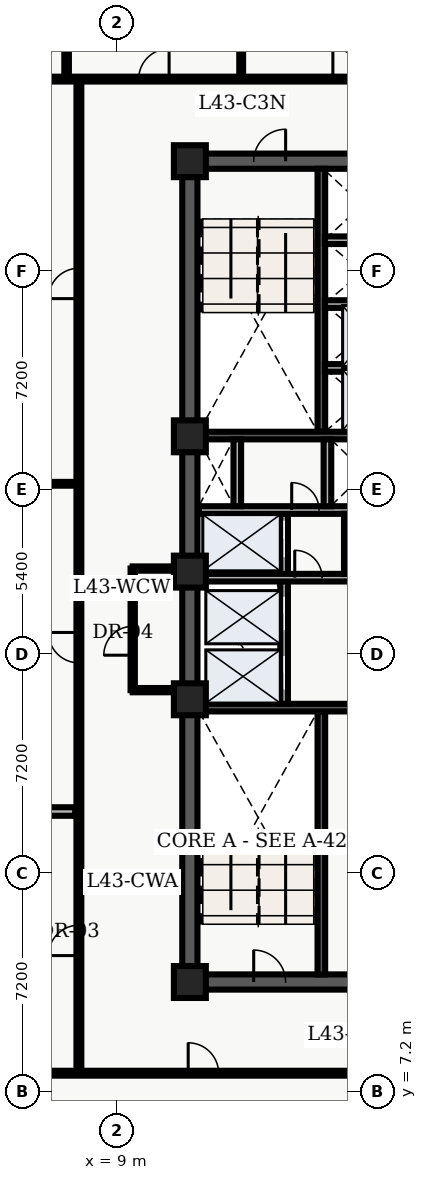
"""IFC4 building model, lengths in metres.
Left out: names, types, materials, properties, quantities, classifications, styles, units other than length and angle.
Written with IfcOpenShell. Run it as: python <this file> out.ifc"""

import sys

from ifc_helpers import new_model, entity, si_unit, converted_unit, direction, frame, origin_with_axes, origin_2d_with_axis, place, context, subcontext, project, spatial, polyline, rectangle, outline, extrude, element, fill, save


model = new_model("IFC4")
c1 = context("Model", 3, precision=1e-05, world=origin_with_axes(), true_north=direction((0.0, 1.0)))
c2 = subcontext(c1, "Body", "Model", "MODEL_VIEW")
j1 = project(units=[si_unit("LENGTHUNIT", "METRE"), converted_unit("PLANEANGLEUNIT", "DEGREE", entity("IfcPlaneAngleMeasure", 0.017), si_unit("PLANEANGLEUNIT", "RADIAN"), dimensions=[0, 0, 0, 0, 0, 0, 0])], contexts=[c1])
p1 = place(None, origin_with_axes())
s1 = spatial("IfcSite", under=j1, at=p1, CompositionType="ELEMENT")
p2 = place(p1, origin_with_axes())
s2 = spatial("IfcBuilding", under=s1, at=p2, CompositionType="ELEMENT")
p3 = place(p2, frame((0.0, 0.0, 175.8), z_axis=(0.0, 0.0, 1.0), x_axis=(1.0, 0.0, 0.0)))
s3 = spatial("IfcBuildingStorey", under=s2, at=p3, CompositionType="ELEMENT", Elevation=175.8)
p4 = place(p3, frame((11.4, 10.8, 0.0), z_axis=(0.0, 0.0, 1.0), x_axis=(0.0, 1.0, 0.0)))
e1 = element("IfcWall", 1, at=p4, inside=s3, PredefinedType="SHEAR", context=c2, shape_type="SweptSolid", body=[
    extrude(outline(polyline([(0.0, -0.25), (27.0, -0.25), (27.0, 0.25), (0.0, 0.25), (0.0, -0.25)])), origin_with_axes(), (0.0, 0.0, 1.0), 3.66),
])
p5 = place(p3, frame((11.4, 10.8, 0.0), z_axis=(0.0, 0.0, 1.0), x_axis=(1.0, 0.0, 0.0)))
e2 = element("IfcWall", 2, at=p5, inside=s3, PredefinedType="SHEAR", context=c2, shape_type="SweptSolid", body=[
    extrude(outline(polyline([(0.0, -0.25), (7.2, -0.25), (7.2, 0.25), (0.0, 0.25), (0.0, -0.25)])), origin_with_axes(), (0.0, 0.0, 1.0), 3.66),
])
p6 = place(p5, frame((2.625, 0.0, 0.0), z_axis=(0.0, 0.0, 1.0), x_axis=(1.0, 0.0, 0.0)))
e3 = element("IfcOpeningElement", 3, at=p6, cuts=e2, PredefinedType="OPENING", context=c2, shape_type="SweptSolid", body=[
    extrude(rectangle(XDim=1.05, YDim=0.52, at=origin_2d_with_axis()), origin_with_axes(), (0.0, 0.0, 1.0), 2.15),
])
p7 = place(p3, frame((11.4, 37.8, 0.0), z_axis=(0.0, 0.0, 1.0), x_axis=(1.0, 0.0, 0.0)))
e4 = element("IfcWall", 4, at=p7, inside=s3, PredefinedType="SHEAR", context=c2, shape_type="SweptSolid", body=[
    extrude(outline(polyline([(0.0, -0.25), (7.2, -0.25), (7.2, 0.25), (0.0, 0.25), (0.0, -0.25)])), origin_with_axes(), (0.0, 0.0, 1.0), 3.66),
])
p8 = place(p7, frame((2.625, 0.0, 0.0), z_axis=(0.0, 0.0, 1.0), x_axis=(1.0, 0.0, 0.0)))
e5 = element("IfcOpeningElement", 5, at=p8, cuts=e4, PredefinedType="OPENING", context=c2, shape_type="SweptSolid", body=[
    extrude(rectangle(XDim=1.05, YDim=0.52, at=origin_2d_with_axis()), origin_with_axes(), (0.0, 0.0, 1.0), 2.15),
])
p9 = place(p3, frame((15.725, 11.05, 0.0), z_axis=(0.0, 0.0, 1.0), x_axis=(0.0, 1.0, 0.0)))
e6 = element("IfcWall", 6, at=p9, inside=s3, PredefinedType="SHEAR", context=c2, shape_type="SweptSolid", body=[
    extrude(outline(polyline([(0.0, -0.125), (8.65, -0.125), (8.65, 0.125), (0.0, 0.125), (0.0, -0.125)])), origin_with_axes(), (0.0, 0.0, 1.0), 3.66),
])
p10 = place(p3, frame((11.65, 19.825, 0.0), z_axis=(0.0, 0.0, 1.0), x_axis=(1.0, 0.0, 0.0)))
e7 = element("IfcWall", 7, at=p10, inside=s3, PredefinedType="SHEAR", context=c2, shape_type="SweptSolid", body=[
    extrude(outline(polyline([(0.0, -0.125), (6.7, -0.125), (6.7, 0.125), (0.0, 0.125), (0.0, -0.125)])), origin_with_axes(), (0.0, 0.0, 1.0), 3.66),
])
p11 = place(p3, frame((15.725, 28.9, 0.0), z_axis=(0.0, 0.0, 1.0), x_axis=(0.0, 1.0, 0.0)))
e8 = element("IfcWall", 8, at=p11, inside=s3, PredefinedType="SHEAR", context=c2, shape_type="SweptSolid", body=[
    extrude(outline(polyline([(0.0, -0.125), (8.65, -0.125), (8.65, 0.125), (0.0, 0.125), (0.0, -0.125)])), origin_with_axes(), (0.0, 0.0, 1.0), 3.66),
])
p12 = place(p3, frame((11.65, 28.775, 0.0), z_axis=(0.0, 0.0, 1.0), x_axis=(1.0, 0.0, 0.0)))
e9 = element("IfcWall", 9, at=p12, inside=s3, PredefinedType="SHEAR", context=c2, shape_type="SweptSolid", body=[
    extrude(outline(polyline([(0.0, -0.125), (6.7, -0.125), (6.7, 0.125), (0.0, 0.125), (0.0, -0.125)])), origin_with_axes(), (0.0, 0.0, 1.0), 3.66),
])
p13 = place(p3, frame((14.5, 19.95, 0.0), z_axis=(0.0, 0.0, 1.0), x_axis=(0.0, 1.0, 0.0)))
e10 = element("IfcWall", 10, at=p13, inside=s3, PredefinedType="SOLIDWALL", context=c2, shape_type="SweptSolid", body=[
    extrude(outline(polyline([(0.0, -0.125), (6.25, -0.125), (6.25, 0.125), (0.0, 0.125), (0.0, -0.125)])), origin_with_axes(), (0.0, 0.0, 1.0), 2.7),
])
p14 = place(p13, frame((1.025, 0.0, 0.0), z_axis=(0.0, 0.0, 1.0), x_axis=(1.0, 0.0, 0.0)))
e11 = element("IfcOpeningElement", 11, at=p14, cuts=e10, PredefinedType="OPENING", context=c2, shape_type="SweptSolid", body=[
    extrude(rectangle(XDim=1.1, YDim=0.27, at=origin_2d_with_axis()), origin_with_axes(), (0.0, 0.0, 1.0), 2.15),
])
p15 = place(p13, frame((2.975, 0.0, 0.0), z_axis=(0.0, 0.0, 1.0), x_axis=(1.0, 0.0, 0.0)))
e12 = element("IfcOpeningElement", 12, at=p15, cuts=e10, PredefinedType="OPENING", context=c2, shape_type="SweptSolid", body=[
    extrude(rectangle(XDim=1.1, YDim=0.27, at=origin_2d_with_axis()), origin_with_axes(), (0.0, 0.0, 1.0), 2.15),
])
p16 = place(p13, frame((5.425, 0.0, 0.0), z_axis=(0.0, 0.0, 1.0), x_axis=(1.0, 0.0, 0.0)))
e13 = element("IfcOpeningElement", 13, at=p16, cuts=e10, PredefinedType="OPENING", context=c2, shape_type="SweptSolid", body=[
    extrude(rectangle(XDim=1.2, YDim=0.27, at=origin_2d_with_axis()), origin_with_axes(), (0.0, 0.0, 1.0), 2.15),
])
p17 = place(p3, frame((11.7, 24.1, 0.0), z_axis=(0.0, 0.0, 1.0), x_axis=(1.0, 0.0, 0.0)))
e14 = element("IfcWall", 14, at=p17, inside=s3, PredefinedType="SOLIDWALL", context=c2, shape_type="SweptSolid", body=[
    extrude(outline(polyline([(0.0, -0.125), (6.6, -0.125), (6.6, 0.125), (0.0, 0.125), (0.0, -0.125)])), origin_with_axes(), (0.0, 0.0, 1.0), 2.7),
])
p18 = place(p17, frame((3.6, 0.0, 0.0), z_axis=(0.0, 0.0, 1.0), x_axis=(1.0, 0.0, 0.0)))
e15 = element("IfcOpeningElement", 15, at=p18, cuts=e14, PredefinedType="OPENING", context=c2, shape_type="SweptSolid", body=[
    extrude(rectangle(XDim=0.9, YDim=0.27, at=origin_2d_with_axis()), origin_with_axes(), (0.0, 0.0, 1.0), 2.15),
])
p19 = place(p17, frame((5.65, 0.0, 0.0), z_axis=(0.0, 0.0, 1.0), x_axis=(1.0, 0.0, 0.0)))
e16 = element("IfcOpeningElement", 16, at=p19, cuts=e14, PredefinedType="OPENING", context=c2, shape_type="SweptSolid", body=[
    extrude(rectangle(XDim=0.9, YDim=0.27, at=origin_2d_with_axis()), origin_with_axes(), (0.0, 0.0, 1.0), 2.15),
])
p20 = place(p3, frame((11.7, 26.325, 0.0), z_axis=(0.0, 0.0, 1.0), x_axis=(1.0, 0.0, 0.0)))
e17 = element("IfcWall", 17, at=p20, inside=s3, PredefinedType="SOLIDWALL", context=c2, shape_type="SweptSolid", body=[
    extrude(outline(polyline([(0.0, -0.125), (6.6, -0.125), (6.6, 0.125), (0.0, 0.125), (0.0, -0.125)])), origin_with_axes(), (0.0, 0.0, 1.0), 2.7),
])
p21 = place(p20, frame((3.5, 0.0, 0.0), z_axis=(0.0, 0.0, 1.0), x_axis=(1.0, 0.0, 0.0)))
e18 = element("IfcOpeningElement", 18, at=p21, cuts=e17, PredefinedType="OPENING", context=c2, shape_type="SweptSolid", body=[
    extrude(rectangle(XDim=0.9, YDim=0.27, at=origin_2d_with_axis()), origin_with_axes(), (0.0, 0.0, 1.0), 2.15),
])
for number, where, z_axis, x_axis in (
    (19, (12.96, 26.45, 0.0), (0.0, 0.0, 1.0), (0.0, 1.0, 0.0)),
    (20, (15.925, 26.45, 0.0), (0.0, 0.0, 1.0), (0.0, 1.0, 0.0)),
):
    element("IfcWall", number, at=place(p3, frame(where, z_axis=z_axis, x_axis=x_axis)), inside=s3, PredefinedType="SOLIDWALL", context=c2, shape_type="SweptSolid", body=[
        extrude(outline(polyline([(0.0, -0.125), (2.2, -0.125), (2.2, 0.125), (0.0, 0.125), (0.0, -0.125)])), origin_with_axes(), (0.0, 0.0, 1.0), 2.7),
    ])
for number, where, z_axis, x_axis in (
    (21, (11.4, 10.8, 0.0), (0.0, 0.0, 1.0), (1.0, 0.0, 0.0)),
    (22, (11.4, 20.1, 0.0), (0.0, 0.0, 1.0), (1.0, 0.0, 0.0)),
    (23, (11.4, 24.3, 0.0), (0.0, 0.0, 1.0), (1.0, 0.0, 0.0)),
    (24, (11.4, 28.75, 0.0), (0.0, 0.0, 1.0), (1.0, 0.0, 0.0)),
    (25, (11.4, 37.8, 0.0), (0.0, 0.0, 1.0), (1.0, 0.0, 0.0)),
):
    element("IfcColumn", number, at=place(p3, frame(where, z_axis=z_axis, x_axis=x_axis)), inside=s3, PredefinedType="COLUMN", context=c2, shape_type="SweptSolid", body=[
        extrude(rectangle(XDim=1.05, YDim=1.05, at=origin_2d_with_axis()), origin_with_axes(), (0.0, 0.0, 1.0), 3.9),
    ])
p22 = place(p3, frame((16.55, 24.22, 0.0), z_axis=(0.0, 0.0, 1.0), x_axis=(0.0, 1.0, 0.0)))
e26 = element("IfcWall", 26, at=p22, inside=s3, PredefinedType="PARTITIONING", context=c2, shape_type="SweptSolid", body=[
    extrude(outline(polyline([(0.0, -0.08), (1.98, -0.08), (1.98, 0.08), (0.0, 0.08), (0.0, -0.08)])), origin_with_axes(), (0.0, 0.0, 1.0), 2.7),
])
p23 = place(p3, frame((15.84, 15.35, 0.0), z_axis=(0.0, 0.0, 1.0), x_axis=(1.0, 0.0, 0.0)))
e27 = element("IfcWall", 27, at=p23, inside=s3, PredefinedType="PARTITIONING", context=c2, shape_type="SweptSolid", body=[
    extrude(outline(polyline([(0.0, -0.08), (2.46, -0.08), (2.46, 0.08), (0.0, 0.08), (0.0, -0.08)])), origin_with_axes(), (0.0, 0.0, 1.0), 2.7),
])
for number, where, z_axis, x_axis in (
    (28, (15.84, 31.0, 0.0), (0.0, 0.0, 1.0), (1.0, 0.0, 0.0)),
    (29, (15.84, 33.1, 0.0), (0.0, 0.0, 1.0), (1.0, 0.0, 0.0)),
    (30, (15.84, 35.2, 0.0), (0.0, 0.0, 1.0), (1.0, 0.0, 0.0)),
):
    element("IfcWall", number, at=place(p3, frame(where, z_axis=z_axis, x_axis=x_axis)), inside=s3, PredefinedType="SOLIDWALL", context=c2, shape_type="SweptSolid", body=[
        extrude(outline(polyline([(0.0, -0.125), (2.46, -0.125), (2.46, 0.125), (0.0, 0.125), (0.0, -0.125)])), origin_with_axes(), (0.0, 0.0, 1.0), 2.7),
    ])
p24 = place(p3, frame((9.52, 20.4, 0.0), z_axis=(0.0, 0.0, 1.0), x_axis=(0.0, 1.0, 0.0)))
e31 = element("IfcWall", 31, at=p24, inside=s3, PredefinedType="PARTITIONING", context=c2, shape_type="SweptSolid", body=[
    extrude(outline(polyline([(0.0, -0.07), (4.0, -0.07), (4.0, 0.07), (0.0, 0.07), (0.0, -0.07)])), origin_with_axes(), (0.0, 0.0, 1.0), 2.7),
])
p25 = place(p24, frame((1.625, 0.0, 0.0), z_axis=(0.0, 0.0, 1.0), x_axis=(1.0, 0.0, 0.0)))
e32 = element("IfcOpeningElement", 32, at=p25, cuts=e31, PredefinedType="OPENING", context=c2, shape_type="SweptSolid", body=[
    extrude(rectangle(XDim=0.95, YDim=0.16, at=origin_2d_with_axis()), origin_with_axes(), (0.0, 0.0, 1.0), 2.15),
])
for number, where, z_axis, x_axis in (
    (33, (9.52, 20.4, 0.0), (0.0, 0.0, 1.0), (1.0, 0.0, 0.0)),
    (34, (9.52, 24.4, 0.0), (0.0, 0.0, 1.0), (1.0, 0.0, 0.0)),
):
    element("IfcWall", number, at=place(p3, frame(where, z_axis=z_axis, x_axis=x_axis)), inside=s3, PredefinedType="PARTITIONING", context=c2, shape_type="SweptSolid", body=[
        extrude(outline(polyline([(0.0, -0.07), (1.58, -0.07), (1.58, 0.07), (0.0, 0.07), (0.0, -0.07)])), origin_with_axes(), (0.0, 0.0, 1.0), 2.7),
    ])
p26 = place(p3, frame((2.6, 7.8, 0.0), z_axis=(0.0, 0.0, 1.0), x_axis=(1.0, 0.0, 0.0)))
e35 = element("IfcWall", 35, at=p26, inside=s3, PredefinedType="PARTITIONING", context=c2, shape_type="SweptSolid", body=[
    extrude(outline(polyline([(0.0, -0.08), (18.55, -0.08), (18.55, 0.08), (0.0, 0.08), (0.0, -0.08)])), origin_with_axes(), (0.0, 0.0, 1.0), 2.7),
])
p27 = place(p26, frame((9.245, 0.0, 0.0), z_axis=(0.0, 0.0, 1.0), x_axis=(1.0, 0.0, 0.0)))
e36 = element("IfcOpeningElement", 36, at=p27, cuts=e35, PredefinedType="OPENING", context=c2, shape_type="SweptSolid", body=[
    extrude(rectangle(XDim=1.0, YDim=0.18, at=origin_2d_with_axis()), origin_with_axes(), (0.0, 0.0, 1.0), 2.15),
])
p28 = place(p3, frame((2.6, 40.5, 0.0), z_axis=(0.0, 0.0, 1.0), x_axis=(1.0, 0.0, 0.0)))
e37 = element("IfcWall", 37, at=p28, inside=s3, PredefinedType="PARTITIONING", context=c2, shape_type="SweptSolid", body=[
    extrude(outline(polyline([(0.0, -0.08), (22.318, -0.08), (22.318, 0.08), (0.0, 0.08), (0.0, -0.08)])), origin_with_axes(), (0.0, 0.0, 1.0), 2.7),
])
p29 = place(p28, frame((2.368, 0.0, 0.0), z_axis=(0.0, 0.0, 1.0), x_axis=(1.0, 0.0, 0.0)))
e38 = element("IfcOpeningElement", 38, at=p29, cuts=e37, PredefinedType="OPENING", context=c2, shape_type="SweptSolid", body=[
    extrude(rectangle(XDim=1.0, YDim=0.18, at=origin_2d_with_axis()), origin_with_axes(), (0.0, 0.0, 1.0), 2.15),
])
p30 = place(p28, frame((7.617, 0.0, 0.0), z_axis=(0.0, 0.0, 1.0), x_axis=(1.0, 0.0, 0.0)))
e39 = element("IfcOpeningElement", 39, at=p30, cuts=e37, PredefinedType="OPENING", context=c2, shape_type="SweptSolid", body=[
    extrude(rectangle(XDim=1.0, YDim=0.18, at=origin_2d_with_axis()), origin_with_axes(), (0.0, 0.0, 1.0), 2.15),
])
p31 = place(p28, frame((14.004, 0.0, 0.0), z_axis=(0.0, 0.0, 1.0), x_axis=(1.0, 0.0, 0.0)))
e40 = element("IfcOpeningElement", 40, at=p31, cuts=e37, PredefinedType="OPENING", context=c2, shape_type="SweptSolid", body=[
    extrude(rectangle(XDim=1.0, YDim=0.18, at=origin_2d_with_axis()), origin_with_axes(), (0.0, 0.0, 1.0), 2.15),
])
p32 = place(p3, frame((7.75, 7.8, 0.0), z_axis=(0.0, 0.0, 1.0), x_axis=(0.0, 1.0, 0.0)))
e41 = element("IfcWall", 41, at=p32, inside=s3, PredefinedType="PARTITIONING", context=c2, shape_type="SweptSolid", body=[
    extrude(outline(polyline([(0.0, -0.08), (32.7, -0.08), (32.7, 0.08), (0.0, 0.08), (0.0, -0.08)])), origin_with_axes(), (0.0, 0.0, 1.0), 2.7),
])
p33 = place(p32, frame((4.369, 0.0, 0.0), z_axis=(0.0, 0.0, 1.0), x_axis=(1.0, 0.0, 0.0)))
e42 = element("IfcOpeningElement", 42, at=p33, cuts=e41, PredefinedType="OPENING", context=c2, shape_type="SweptSolid", body=[
    extrude(rectangle(XDim=1.0, YDim=0.18, at=origin_2d_with_axis()), origin_with_axes(), (0.0, 0.0, 1.0), 2.15),
])
p34 = place(p32, frame((13.998, 0.0, 0.0), z_axis=(0.0, 0.0, 1.0), x_axis=(1.0, 0.0, 0.0)))
e43 = element("IfcOpeningElement", 43, at=p34, cuts=e41, PredefinedType="OPENING", context=c2, shape_type="SweptSolid", body=[
    extrude(rectangle(XDim=1.0, YDim=0.18, at=origin_2d_with_axis()), origin_with_axes(), (0.0, 0.0, 1.0), 2.15),
])
p35 = place(p32, frame((25.979, 0.0, 0.0), z_axis=(0.0, 0.0, 1.0), x_axis=(1.0, 0.0, 0.0)))
e44 = element("IfcOpeningElement", 44, at=p35, cuts=e41, PredefinedType="OPENING", context=c2, shape_type="SweptSolid", body=[
    extrude(rectangle(XDim=1.0, YDim=0.18, at=origin_2d_with_axis()), origin_with_axes(), (0.0, 0.0, 1.0), 2.15),
])
p36 = place(p3, frame((0.335, 16.408, 0.0), z_axis=(0.0, 0.0, 1.0), x_axis=(1.0, 0.0, 0.0)))
e45 = element("IfcWall", 45, at=p36, inside=s3, PredefinedType="PARTITIONING", context=c2, shape_type="SweptSolid", body=[
    extrude(outline(polyline([(0.0, -0.14), (7.295, -0.14), (7.295, 0.14), (0.0, 0.14), (0.0, -0.14)])), origin_with_axes(), (0.0, 0.0, 1.0), 2.7),
])
p37 = place(p3, frame((0.335, 27.188, 0.0), z_axis=(0.0, 0.0, 1.0), x_axis=(1.0, 0.0, 0.0)))
e46 = element("IfcWall", 46, at=p37, inside=s3, PredefinedType="PARTITIONING", context=c2, shape_type="SweptSolid", body=[
    extrude(outline(polyline([(0.0, -0.062), (7.295, -0.062), (7.295, 0.062), (0.0, 0.062), (0.0, -0.062)])), origin_with_axes(), (0.0, 0.0, 1.0), 2.7),
])
p38 = place(p3, frame((7.346, 40.6, 0.0), z_axis=(0.0, 0.0, 1.0), x_axis=(0.0, 1.0, 0.0)))
e47 = element("IfcWall", 47, at=p38, inside=s3, PredefinedType="PARTITIONING", context=c2, shape_type="SweptSolid", body=[
    extrude(outline(polyline([(0.0, -0.075), (7.665, -0.075), (7.665, 0.075), (0.0, 0.075), (0.0, -0.075)])), origin_with_axes(), (0.0, 0.0, 1.0), 2.7),
])
p39 = place(p3, frame((13.088, 40.6, 0.0), z_axis=(0.0, 0.0, 1.0), x_axis=(0.0, 1.0, 0.0)))
e48 = element("IfcWall", 48, at=p39, inside=s3, PredefinedType="PARTITIONING", context=c2, shape_type="SweptSolid", body=[
    extrude(outline(polyline([(0.0, -0.062), (7.665, -0.062), (7.665, 0.062), (0.0, 0.062), (0.0, -0.062)])), origin_with_axes(), (0.0, 0.0, 1.0), 2.7),
])
p40 = place(p13, frame((1.025, 0.0, 0.0), z_axis=(0.0, 0.0, 1.0), x_axis=(1.0, 0.0, 0.0)))
e49 = element("IfcDoor", 49, at=p40, inside=s3, OperationType="SLIDING_TO_LEFT", PredefinedType="DOOR", context=c2, shape_type="SweptSolid", body=[
    extrude(rectangle(XDim=1.1, YDim=0.09, at=origin_2d_with_axis()), origin_with_axes(), (0.0, 0.0, 1.0), 2.15),
])
fill(e11, e49)
p41 = place(p13, frame((2.975, 0.0, 0.0), z_axis=(0.0, 0.0, 1.0), x_axis=(1.0, 0.0, 0.0)))
e50 = element("IfcDoor", 50, at=p41, inside=s3, OperationType="SLIDING_TO_RIGHT", PredefinedType="DOOR", context=c2, shape_type="SweptSolid", body=[
    extrude(rectangle(XDim=1.1, YDim=0.09, at=origin_2d_with_axis()), origin_with_axes(), (0.0, 0.0, 1.0), 2.15),
])
fill(e12, e50)
p42 = place(p13, frame((5.425, 0.0, 0.0), z_axis=(0.0, 0.0, 1.0), x_axis=(1.0, 0.0, 0.0)))
e51 = element("IfcDoor", 51, at=p42, inside=s3, OperationType="DOUBLE_DOOR_SLIDING", PredefinedType="DOOR", context=c2, shape_type="SweptSolid", body=[
    extrude(rectangle(XDim=1.2, YDim=0.09, at=origin_2d_with_axis()), origin_with_axes(), (0.0, 0.0, 1.0), 2.15),
])
fill(e13, e51)
p43 = place(p5, frame((2.625, 0.0, 0.0), z_axis=(0.0, 0.0, 1.0), x_axis=(1.0, 0.0, 0.0)))
e52 = element("IfcDoor", 52, at=p43, inside=s3, OperationType="SINGLE_SWING_LEFT", PredefinedType="DOOR", context=c2, shape_type="SweptSolid", body=[
    extrude(rectangle(XDim=1.05, YDim=0.09, at=origin_2d_with_axis()), origin_with_axes(), (0.0, 0.0, 1.0), 2.15),
])
fill(e3, e52)
p44 = place(p7, frame((2.625, 0.0, 0.0), z_axis=(0.0, 0.0, 1.0), x_axis=(1.0, 0.0, 0.0)))
e53 = element("IfcDoor", 53, at=p44, inside=s3, OperationType="SINGLE_SWING_RIGHT", PredefinedType="DOOR", context=c2, shape_type="SweptSolid", body=[
    extrude(rectangle(XDim=1.05, YDim=0.09, at=origin_2d_with_axis()), origin_with_axes(), (0.0, 0.0, 1.0), 2.15),
])
fill(e5, e53)
p45 = place(p17, frame((3.6, 0.0, 0.0), z_axis=(0.0, 0.0, 1.0), x_axis=(1.0, 0.0, 0.0)))
e54 = element("IfcDoor", 54, at=p45, inside=s3, OperationType="SINGLE_SWING_LEFT", PredefinedType="DOOR", context=c2, shape_type="SweptSolid", body=[
    extrude(rectangle(XDim=0.9, YDim=0.09, at=origin_2d_with_axis()), origin_with_axes(), (0.0, 0.0, 1.0), 2.15),
])
fill(e15, e54)
p46 = place(p20, frame((3.5, 0.0, 0.0), z_axis=(0.0, 0.0, 1.0), x_axis=(1.0, 0.0, 0.0)))
e55 = element("IfcDoor", 55, at=p46, inside=s3, OperationType="SINGLE_SWING_LEFT", PredefinedType="DOOR", context=c2, shape_type="SweptSolid", body=[
    extrude(rectangle(XDim=0.9, YDim=0.09, at=origin_2d_with_axis()), origin_with_axes(), (0.0, 0.0, 1.0), 2.15),
])
fill(e18, e55)
p47 = place(p24, frame((1.625, 0.0, 0.0), z_axis=(0.0, 0.0, 1.0), x_axis=(1.0, 0.0, 0.0)))
e56 = element("IfcDoor", 56, at=p47, inside=s3, OperationType="SINGLE_SWING_LEFT", PredefinedType="DOOR", context=c2, shape_type="SweptSolid", body=[
    extrude(rectangle(XDim=0.95, YDim=0.084, at=origin_2d_with_axis()), origin_with_axes(), (0.0, 0.0, 1.0), 2.15),
])
fill(e32, e56)
p48 = place(p32, frame((4.369, 0.0, 0.0), z_axis=(0.0, 0.0, 1.0), x_axis=(1.0, 0.0, 0.0)))
e57 = element("IfcDoor", 57, at=p48, inside=s3, OperationType="SINGLE_SWING_LEFT", PredefinedType="DOOR", context=c2, shape_type="SweptSolid", body=[
    extrude(rectangle(XDim=1.0, YDim=0.09, at=origin_2d_with_axis()), origin_with_axes(), (0.0, 0.0, 1.0), 2.15),
])
fill(e42, e57)
p49 = place(p32, frame((13.998, 0.0, 0.0), z_axis=(0.0, 0.0, 1.0), x_axis=(1.0, 0.0, 0.0)))
e58 = element("IfcDoor", 58, at=p49, inside=s3, OperationType="SINGLE_SWING_RIGHT", PredefinedType="DOOR", context=c2, shape_type="SweptSolid", body=[
    extrude(rectangle(XDim=1.0, YDim=0.09, at=origin_2d_with_axis()), origin_with_axes(), (0.0, 0.0, 1.0), 2.15),
])
fill(e43, e58)
p50 = place(p32, frame((25.979, 0.0, 0.0), z_axis=(0.0, 0.0, 1.0), x_axis=(1.0, 0.0, 0.0)))
e59 = element("IfcDoor", 59, at=p50, inside=s3, OperationType="SINGLE_SWING_LEFT", PredefinedType="DOOR", context=c2, shape_type="SweptSolid", body=[
    extrude(rectangle(XDim=1.0, YDim=0.09, at=origin_2d_with_axis()), origin_with_axes(), (0.0, 0.0, 1.0), 2.15),
])
fill(e44, e59)
p51 = place(p26, frame((9.245, 0.0, 0.0), z_axis=(0.0, 0.0, 1.0), x_axis=(1.0, 0.0, 0.0)))
e60 = element("IfcDoor", 60, at=p51, inside=s3, OperationType="SINGLE_SWING_LEFT", PredefinedType="DOOR", context=c2, shape_type="SweptSolid", body=[
    extrude(rectangle(XDim=1.0, YDim=0.09, at=origin_2d_with_axis()), origin_with_axes(), (0.0, 0.0, 1.0), 2.15),
])
fill(e36, e60)
p52 = place(p28, frame((7.617, 0.0, 0.0), z_axis=(0.0, 0.0, 1.0), x_axis=(1.0, 0.0, 0.0)))
e61 = element("IfcDoor", 61, at=p52, inside=s3, OperationType="SINGLE_SWING_RIGHT", PredefinedType="DOOR", context=c2, shape_type="SweptSolid", body=[
    extrude(rectangle(XDim=1.0, YDim=0.09, at=origin_2d_with_axis()), origin_with_axes(), (0.0, 0.0, 1.0), 2.15),
])
fill(e39, e61)
p53 = place(p28, frame((14.004, 0.0, 0.0), z_axis=(0.0, 0.0, 1.0), x_axis=(1.0, 0.0, 0.0)))
e62 = element("IfcDoor", 62, at=p53, inside=s3, OperationType="SINGLE_SWING_LEFT", PredefinedType="DOOR", context=c2, shape_type="SweptSolid", body=[
    extrude(rectangle(XDim=1.0, YDim=0.09, at=origin_2d_with_axis()), origin_with_axes(), (0.0, 0.0, 1.0), 2.15),
])
fill(e40, e62)
save(model, sys.argv[1])
